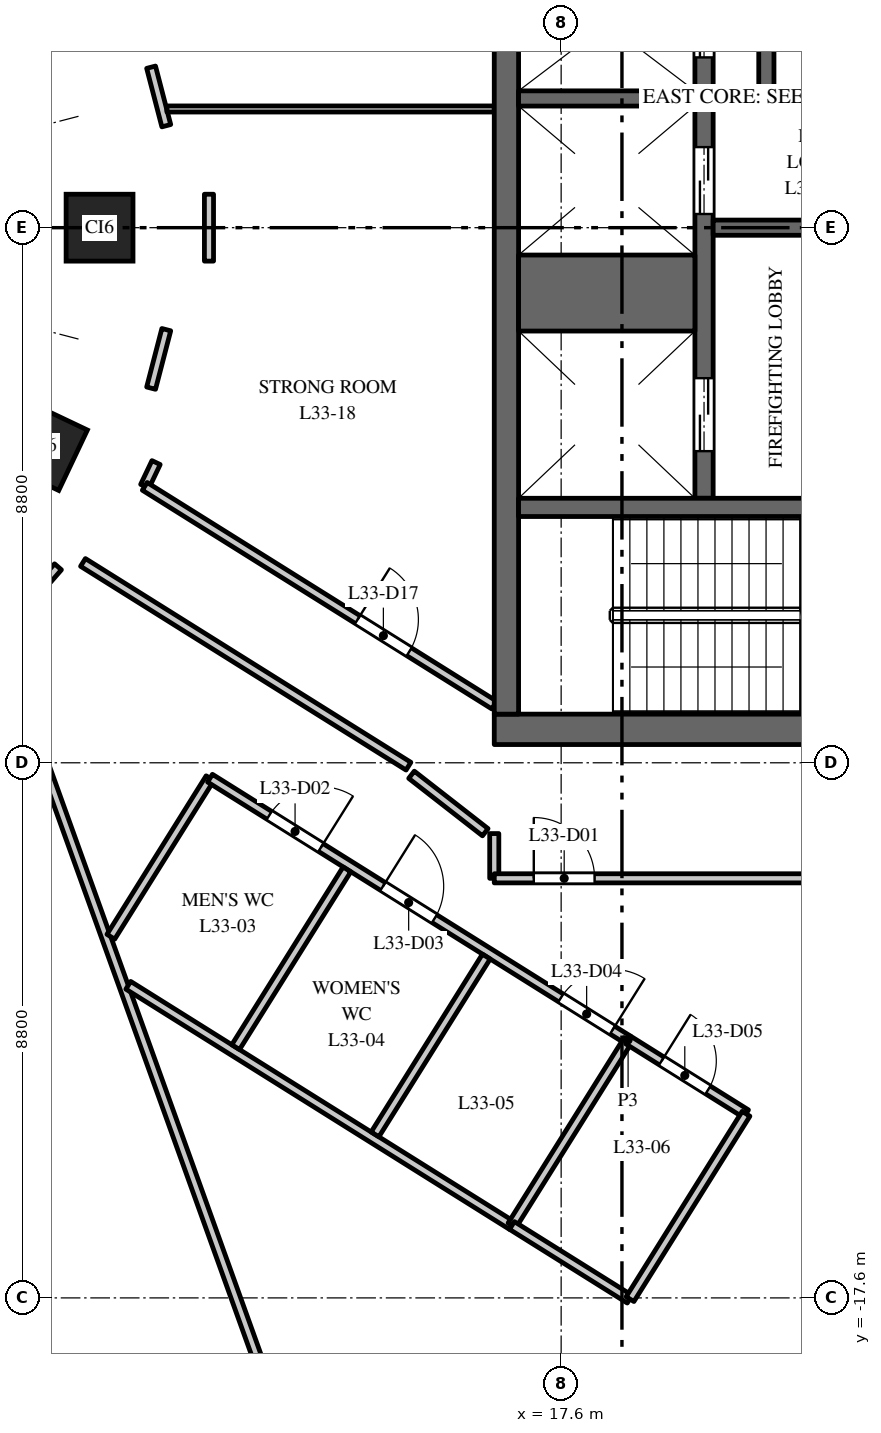
"""IFC4 building model, lengths in metres.
Left out: names, types, materials, properties, quantities, classifications, styles, units other than length and angle.
Written with IfcOpenShell. Run it as: python <this file> out.ifc"""

import sys

from ifc_helpers import new_model, si_unit, direction, frame, frame_2d, origin, origin_2d, place, context, subcontext, project, spatial, rectangle, extrude, element, fill, save


model = new_model("IFC4")
c1 = context("Model", 3, precision=1e-05, world=origin(), true_north=direction((0.0, 1.0)))
c2 = subcontext(c1, "Body", "Model", "MODEL_VIEW")
j1 = project(units=[si_unit("LENGTHUNIT", "METRE"), si_unit("PLANEANGLEUNIT", "RADIAN")], contexts=[c1])
p1 = place(None, origin())
s1 = spatial("IfcSite", under=j1, at=p1, CompositionType="ELEMENT")
p2 = place(p1, origin())
s2 = spatial("IfcBuilding", under=s1, at=p2, CompositionType="ELEMENT")
p3 = place(p2, frame((0.0, 0.0, 146.0)))
s3 = spatial("IfcBuildingStorey", under=s2, at=p3, CompositionType="ELEMENT", Elevation=146.0)
for number, where, z_axis, x_axis in (
    (1, (10.008, 0.0, 0.0), (0.0, 0.0, 1.0), (0.0, 1.0, 0.0)),
    (2, (9.076, 3.588, 0.0), (0.0, 0.0, 1.0), (-0.429, 0.903, 0.0)),
    (3, (9.076, -3.588, 0.0), (0.0, 0.0, 1.0), (0.429, 0.903, 0.0)),
):
    element("IfcColumn", number, at=place(p3, frame(where, z_axis=z_axis, x_axis=x_axis)), inside=s3, PredefinedType="COLUMN", context=c2, shape_type="SweptSolid", body=[
        extrude(rectangle(XDim=1.1, YDim=1.1, at=origin_2d()), origin(), (0.0, 0.0, 1.0), 4.0),
    ])
p4 = place(p3, frame((16.5, -8.25, 0.0), z_axis=(0.0, 0.0, 1.0), x_axis=(1.0, 0.0, 0.0)))
e4 = element("IfcWall", 4, at=p4, inside=s3, PredefinedType="SHEAR", context=c2, shape_type="SweptSolid", body=[
    extrude(rectangle(XDim=15.0, YDim=0.5, at=frame_2d((7.5, 0.0))), origin(), (0.0, 0.0, 1.0), 3.7),
])
p5 = place(p4, frame((6.9, 0.0, 0.0)))
e5 = element("IfcOpeningElement", 5, at=p5, cuts=e4, PredefinedType="OPENING", context=c2, shape_type="SweptSolid", body=[
    extrude(rectangle(XDim=1.2, YDim=2.1, at=frame_2d((0.6, 1.05))), frame((0.0, 0.26, 0.0), z_axis=(0.0, -1.0, 0.0), x_axis=(1.0, 0.0, 0.0)), (0.0, 0.0, 1.0), 0.52),
])
p6 = place(p4, frame((12.425, 0.0, 0.0)))
e6 = element("IfcOpeningElement", 6, at=p6, cuts=e4, PredefinedType="OPENING", context=c2, shape_type="SweptSolid", body=[
    extrude(rectangle(XDim=0.9, YDim=2.1, at=frame_2d((0.45, 1.05))), frame((0.0, 0.26, 0.0), z_axis=(0.0, -1.0, 0.0), x_axis=(1.0, 0.0, 0.0)), (0.0, 0.0, 1.0), 0.52),
])
p7 = place(p3, frame((19.95, -4.45, 0.0), z_axis=(0.0, 0.0, 1.0), x_axis=(0.0, 1.0, 0.0)))
e7 = element("IfcWall", 7, at=p7, inside=s3, PredefinedType="SHEAR", context=c2, shape_type="SweptSolid", body=[
    extrude(rectangle(XDim=8.9, YDim=0.3, at=frame_2d((4.45, 0.0))), origin(), (0.0, 0.0, 1.0), 3.7),
])
p8 = place(p7, frame((0.775, 0.0, 0.0)))
e8 = element("IfcOpeningElement", 8, at=p8, cuts=e7, PredefinedType="OPENING", context=c2, shape_type="SweptSolid", body=[
    extrude(rectangle(XDim=1.2, YDim=2.1, at=frame_2d((0.6, 1.05))), frame((0.0, 0.16, 0.0), z_axis=(0.0, -1.0, 0.0), x_axis=(1.0, 0.0, 0.0)), (0.0, 0.0, 1.0), 0.32),
])
p9 = place(p7, frame((4.675, 0.0, 0.0)))
e9 = element("IfcOpeningElement", 9, at=p9, cuts=e7, PredefinedType="OPENING", context=c2, shape_type="SweptSolid", body=[
    extrude(rectangle(XDim=1.1, YDim=2.1, at=frame_2d((0.55, 1.05))), frame((0.0, 0.16, 0.0), z_axis=(0.0, -1.0, 0.0), x_axis=(1.0, 0.0, 0.0)), (0.0, 0.0, 1.0), 0.32),
])
p10 = place(p7, frame((7.25, 0.0, 0.0)))
e10 = element("IfcOpeningElement", 10, at=p10, cuts=e7, PredefinedType="OPENING", context=c2, shape_type="SweptSolid", body=[
    extrude(rectangle(XDim=1.1, YDim=2.1, at=frame_2d((0.55, 1.05))), frame((0.0, 0.16, 0.0), z_axis=(0.0, -1.0, 0.0), x_axis=(1.0, 0.0, 0.0)), (0.0, 0.0, 1.0), 0.32),
])
p11 = place(p3, frame((20.1, 0.0, 0.0), z_axis=(0.0, 0.0, 1.0), x_axis=(1.0, 0.0, 0.0)))
e11 = element("IfcWall", 11, at=p11, inside=s3, PredefinedType="SHEAR", context=c2, shape_type="SweptSolid", body=[
    extrude(rectangle(XDim=3.28, YDim=0.25, at=frame_2d((1.64, 0.0))), origin(), (0.0, 0.0, 1.0), 3.7),
])
p12 = place(p3, frame((16.7, -8.0, 0.0), z_axis=(0.0, 0.0, 1.0), x_axis=(0.0, 1.0, 0.0)))
e12 = element("IfcWall", 12, at=p12, inside=s3, PredefinedType="SHEAR", context=c2, shape_type="SweptSolid", body=[
    extrude(rectangle(XDim=16.0, YDim=0.4, at=frame_2d((8.0, 0.0))), origin(), (0.0, 0.0, 1.0), 3.7),
])
p13 = place(p3, frame((16.9, -1.075, 0.0), z_axis=(0.0, 0.0, 1.0), x_axis=(1.0, 0.0, 0.0)))
e13 = element("IfcWall", 13, at=p13, inside=s3, PredefinedType="SHEAR", context=c2, shape_type="SweptSolid", body=[
    extrude(rectangle(XDim=2.9, YDim=1.25, at=frame_2d((1.45, 0.0))), origin(), (0.0, 0.0, 1.0), 3.7),
])
p14 = place(p3, frame((16.9, 2.125, 0.0), z_axis=(0.0, 0.0, 1.0), x_axis=(1.0, 0.0, 0.0)))
e14 = element("IfcWall", 14, at=p14, inside=s3, PredefinedType="SHEAR", context=c2, shape_type="SweptSolid", body=[
    extrude(rectangle(XDim=2.9, YDim=0.25, at=frame_2d((1.45, 0.0))), origin(), (0.0, 0.0, 1.0), 3.7),
])
p15 = place(p3, frame((16.9, -4.6, 0.0), z_axis=(0.0, 0.0, 1.0), x_axis=(1.0, 0.0, 0.0)))
e15 = element("IfcWall", 15, at=p15, inside=s3, PredefinedType="SHEAR", context=c2, shape_type="SweptSolid", body=[
    extrude(rectangle(XDim=6.18, YDim=0.3, at=frame_2d((3.09, 0.0))), origin(), (0.0, 0.0, 1.0), 3.7),
])
p16 = place(p15, frame((4.9, 0.0, 0.0)))
e16 = element("IfcOpeningElement", 16, at=p16, cuts=e15, PredefinedType="OPENING", context=c2, shape_type="SweptSolid", body=[
    extrude(rectangle(XDim=1.1, YDim=2.1, at=frame_2d((0.55, 1.05))), frame((0.0, 0.16, 0.0), z_axis=(0.0, -1.0, 0.0), x_axis=(1.0, 0.0, 0.0)), (0.0, 0.0, 1.0), 0.32),
])
p17 = place(p3, frame((20.85, 2.125, 0.0), z_axis=(0.0, 0.0, 1.0), x_axis=(1.0, 0.0, 0.0)))
e17 = element("IfcWall", 17, at=p17, inside=s3, PredefinedType="SHEAR", context=c2, shape_type="SweptSolid", body=[
    extrude(rectangle(XDim=2.53, YDim=0.25, at=frame_2d((1.265, 0.0))), origin(), (0.0, 0.0, 1.0), 3.7),
])
p18 = place(p3, frame((20.975, 2.25, 0.0), z_axis=(0.0, 0.0, 1.0), x_axis=(0.0, 1.0, 0.0)))
e18 = element("IfcWall", 18, at=p18, inside=s3, PredefinedType="SHEAR", context=c2, shape_type="SweptSolid", body=[
    extrude(rectangle(XDim=2.2, YDim=0.25, at=frame_2d((1.1, 0.0))), origin(), (0.0, 0.0, 1.0), 3.7),
])
p19 = place(p3, frame((8.478, -7.111, 0.0), z_axis=(0.0, 0.0, 1.0), x_axis=(0.338361922043, -0.941016051782, 0.0)))
e19 = element("IfcWall", 19, at=p19, inside=s3, PredefinedType="PARTITIONING", context=c2, shape_type="SweptSolid", body=[
    extrude(rectangle(XDim=19.417, YDim=0.15, at=frame_2d((9.708, 0.0))), origin(), (0.0, 0.0, 1.0), 2.85),
])
p20 = place(p3, frame((8.709, -6.285, 0.0), z_axis=(0.0, 0.0, 1.0), x_axis=(0.656365478363, 0.754443078578, 0.0)))
e20 = element("IfcWall", 20, at=p20, inside=s3, PredefinedType="PARTITIONING", context=c2, shape_type="SweptSolid", body=[
    extrude(rectangle(XDim=0.938, YDim=0.15, at=frame_2d((0.469, 0.0))), origin(), (0.0, 0.0, 1.0), 3.7),
])
p21 = place(p3, frame((9.736, -5.505, 0.0), z_axis=(0.0, 0.0, 1.0), x_axis=(0.847611500167, -0.53061732424, 0.0)))
e21 = element("IfcWall", 21, at=p21, inside=s3, PredefinedType="PARTITIONING", context=c2, shape_type="SweptSolid", body=[
    extrude(rectangle(XDim=6.315, YDim=0.15, at=frame_2d((3.158, 0.0))), origin(), (0.0, 0.0, 1.0), 3.7),
])
p22 = place(p3, frame((10.194, -11.661, 0.0), z_axis=(0.0, 0.0, 1.0), x_axis=(0.530355722606, 0.847775210477, 0.0)))
e22 = element("IfcWall", 22, at=p22, inside=s3, PredefinedType="PARTITIONING", context=c2, shape_type="SweptSolid", body=[
    extrude(rectangle(XDim=3.075, YDim=0.15, at=frame_2d((1.538, 0.0))), origin(), (0.0, 0.0, 1.0), 3.7),
])
p23 = place(p3, frame((10.481, -12.459, 0.0), z_axis=(0.0, 0.0, 1.0), x_axis=(0.847566924978, -0.530688522283, 0.0)))
e23 = element("IfcWall", 23, at=p23, inside=s3, PredefinedType="PARTITIONING", context=c2, shape_type="SweptSolid", body=[
    extrude(rectangle(XDim=7.445, YDim=0.15, at=frame_2d((3.722, 0.0))), origin(), (0.0, 0.0, 1.0), 3.7),
])
p24 = place(p3, frame((10.752, -4.254, 0.0), z_axis=(0.0, 0.0, 1.0), x_axis=(0.429758433873, 0.90294390109, 0.0)))
e24 = element("IfcWall", 24, at=p24, inside=s3, PredefinedType="PARTITIONING", context=c2, shape_type="SweptSolid", body=[
    extrude(rectangle(XDim=0.433, YDim=0.15, at=frame_2d((0.216, 0.0))), origin(), (0.0, 0.0, 1.0), 3.7),
])
p25 = place(p3, frame((10.752, -4.254, 0.0), z_axis=(0.0, 0.0, 1.0), x_axis=(0.847690706888, -0.530490777917, 0.0)))
e25 = element("IfcWall", 25, at=p25, inside=s3, PredefinedType="PARTITIONING", context=c2, shape_type="SweptSolid", body=[
    extrude(rectangle(XDim=6.781, YDim=0.15, at=frame_2d((3.39, 0.0))), origin(), (0.0, 0.0, 1.0), 3.7),
])
p26 = place(p25, frame((4.129, 0.0, 0.0)))
e26 = element("IfcOpeningElement", 26, at=p26, cuts=e25, PredefinedType="OPENING", context=c2, shape_type="SweptSolid", body=[
    extrude(rectangle(XDim=1.0, YDim=2.1, at=frame_2d((0.5, 1.05))), frame((0.0, 0.085, 0.0), z_axis=(0.0, -1.0, 0.0), x_axis=(1.0, 0.0, 0.0)), (0.0, 0.0, 1.0), 0.17),
])
for number, where, z_axis, x_axis in (
    (27, (10.856, -2.639, 0.0), (0.0, 0.0, 1.0), (0.252, 0.968, 0.0)),
    (28, (10.856, 2.639, 0.0), (0.0, 0.0, 1.0), (0.252, -0.968, 0.0)),
):
    element("IfcWall", number, at=place(p3, frame(where, z_axis=z_axis, x_axis=x_axis)), inside=s3, PredefinedType="PARTITIONING", context=c2, shape_type="SweptSolid", body=[
        extrude(rectangle(XDim=0.994, YDim=0.15, at=frame_2d((0.497, 0.0))), origin(), (0.0, 0.0, 1.0), 3.7),
    ])
p27 = place(p3, frame((11.116, 1.952, 0.0), z_axis=(0.0, 0.0, 1.0), x_axis=(1.0, 0.0, 0.0)))
e29 = element("IfcWall", 29, at=p27, inside=s3, PredefinedType="PARTITIONING", context=c2, shape_type="SweptSolid", body=[
    extrude(rectangle(XDim=5.384, YDim=0.1, at=frame_2d((2.692, 0.0))), origin(), (0.0, 0.0, 1.0), 3.7),
])
p28 = place(p3, frame((11.808, -0.55, 0.0), z_axis=(0.0, 0.0, 1.0), x_axis=(0.0, 1.0, 0.0)))
e30 = element("IfcWall", 30, at=p28, inside=s3, PredefinedType="PARTITIONING", context=c2, shape_type="SweptSolid", body=[
    extrude(rectangle(XDim=1.1, YDim=0.15, at=frame_2d((0.55, 0.0))), origin(), (0.0, 0.0, 1.0), 3.7),
])
p29 = place(p3, frame((11.825, -9.053, 0.0), z_axis=(0.0, 0.0, 1.0), x_axis=(0.847585513821, -0.530658832737, 0.0)))
e31 = element("IfcWall", 31, at=p29, inside=s3, PredefinedType="PARTITIONING", context=c2, shape_type="SweptSolid", body=[
    extrude(rectangle(XDim=8.113, YDim=0.15, at=frame_2d((4.056, 0.0))), origin(), (0.0, 0.0, 1.0), 3.7),
])
p30 = place(p29, frame((1.15, 0.0, 0.0)))
e32 = element("IfcOpeningElement", 32, at=p30, cuts=e31, PredefinedType="OPENING", context=c2, shape_type="SweptSolid", body=[
    extrude(rectangle(XDim=1.0, YDim=2.1, at=frame_2d((0.5, 1.05))), frame((0.0, 0.085, 0.0), z_axis=(0.0, -1.0, 0.0), x_axis=(1.0, 0.0, 0.0)), (0.0, 0.0, 1.0), 0.17),
])
p31 = place(p29, frame((3.355, 0.0, 0.0)))
e33 = element("IfcOpeningElement", 33, at=p31, cuts=e31, PredefinedType="OPENING", context=c2, shape_type="SweptSolid", body=[
    extrude(rectangle(XDim=1.0, YDim=2.1, at=frame_2d((0.5, 1.05))), frame((0.0, 0.085, 0.0), z_axis=(0.0, -1.0, 0.0), x_axis=(1.0, 0.0, 0.0)), (0.0, 0.0, 1.0), 0.17),
])
p32 = place(p29, frame((6.808, 0.0, 0.0)))
e34 = element("IfcOpeningElement", 34, at=p32, cuts=e31, PredefinedType="OPENING", context=c2, shape_type="SweptSolid", body=[
    extrude(rectangle(XDim=1.0, YDim=2.1, at=frame_2d((0.5, 1.05))), frame((0.0, 0.085, 0.0), z_axis=(0.0, -1.0, 0.0), x_axis=(1.0, 0.0, 0.0)), (0.0, 0.0, 1.0), 0.17),
])
p33 = place(p3, frame((12.247, -13.476, 0.0), z_axis=(0.0, 0.0, 1.0), x_axis=(0.530603340991, 0.847620253727, 0.0)))
e35 = element("IfcWall", 35, at=p33, inside=s3, PredefinedType="PARTITIONING", context=c2, shape_type="SweptSolid", body=[
    extrude(rectangle(XDim=3.448, YDim=0.15, at=frame_2d((1.724, 0.0))), origin(), (0.0, 0.0, 1.0), 3.7),
])
p34 = place(p3, frame((14.539, -14.911, 0.0), z_axis=(0.0, 0.0, 1.0), x_axis=(0.530507835566, 0.847680031853, 0.0)))
e36 = element("IfcWall", 36, at=p34, inside=s3, PredefinedType="PARTITIONING", context=c2, shape_type="SweptSolid", body=[
    extrude(rectangle(XDim=3.449, YDim=0.15, at=frame_2d((1.725, 0.0))), origin(), (0.0, 0.0, 1.0), 3.7),
])
p35 = place(p3, frame((16.5, -10.7, 0.0), z_axis=(0.0, 0.0, 1.0), x_axis=(0.0, 1.0, 0.0)))
e37 = element("IfcWall", 37, at=p35, inside=s3, PredefinedType="PARTITIONING", context=c2, shape_type="SweptSolid", body=[
    extrude(rectangle(XDim=0.736, YDim=0.15, at=frame_2d((0.368, 0.0))), origin(), (0.0, 0.0, 1.0), 3.7),
])
p36 = place(p3, frame((16.5, -10.7, 0.0), z_axis=(0.0, 0.0, 1.0), x_axis=(1.0, 0.0, 0.0)))
e38 = element("IfcWall", 38, at=p36, inside=s3, PredefinedType="PARTITIONING", context=c2, shape_type="SweptSolid", body=[
    extrude(rectangle(XDim=15.0, YDim=0.15, at=frame_2d((7.5, 0.0))), origin(), (0.0, 0.0, 1.0), 2.75),
])
p37 = place(p36, frame((0.65, 0.0, 0.0)))
e39 = element("IfcOpeningElement", 39, at=p37, cuts=e38, PredefinedType="OPENING", context=c2, shape_type="SweptSolid", body=[
    extrude(rectangle(XDim=1.0, YDim=2.1, at=frame_2d((0.5, 1.05))), frame((0.0, 0.085, 0.0), z_axis=(0.0, -1.0, 0.0), x_axis=(1.0, 0.0, 0.0)), (0.0, 0.0, 1.0), 0.17),
])
p38 = place(p36, frame((8.847, 0.0, 0.0)))
e40 = element("IfcOpeningElement", 40, at=p38, cuts=e38, PredefinedType="OPENING", context=c2, shape_type="SweptSolid", body=[
    extrude(rectangle(XDim=1.0, YDim=2.1, at=frame_2d((0.5, 1.05))), frame((0.0, 0.085, 0.0), z_axis=(0.0, -1.0, 0.0), x_axis=(1.0, 0.0, 0.0)), (0.0, 0.0, 1.0), 0.17),
])
p39 = place(p3, frame((16.791, -16.409, 0.0), z_axis=(0.0, 0.0, 1.0), x_axis=(0.530602380468, 0.847620855006, 0.0)))
e41 = element("IfcWall", 41, at=p39, inside=s3, PredefinedType="PARTITIONING", context=c2, shape_type="SweptSolid", body=[
    extrude(rectangle(XDim=3.6, YDim=0.15, at=frame_2d((1.8, 0.0))), origin(), (0.0, 0.0, 1.0), 3.7),
])
p40 = place(p3, frame((16.791, -16.409, 0.0), z_axis=(0.0, 0.0, 1.0), x_axis=(0.847577713145, -0.530671292026, 0.0)))
e42 = element("IfcWall", 42, at=p40, inside=s3, PredefinedType="PARTITIONING", context=c2, shape_type="SweptSolid", body=[
    extrude(rectangle(XDim=2.284, YDim=0.15, at=frame_2d((1.142, 0.0))), origin(), (0.0, 0.0, 1.0), 3.7),
])
p41 = place(p3, frame((18.701, -13.358, 0.0), z_axis=(0.0, 0.0, 1.0), x_axis=(0.847704532397, -0.530468684989, 0.0)))
e43 = element("IfcWall", 43, at=p41, inside=s3, PredefinedType="PARTITIONING", context=c2, shape_type="SweptSolid", body=[
    extrude(rectangle(XDim=2.289, YDim=0.15, at=frame_2d((1.145, 0.0))), origin(), (0.0, 0.0, 1.0), 3.7),
])
p42 = place(p41, frame((0.65, 0.0, 0.0)))
e44 = element("IfcOpeningElement", 44, at=p42, cuts=e43, PredefinedType="OPENING", context=c2, shape_type="SweptSolid", body=[
    extrude(rectangle(XDim=0.9, YDim=2.1, at=frame_2d((0.45, 1.05))), frame((0.0, 0.085, 0.0), z_axis=(0.0, -1.0, 0.0), x_axis=(1.0, 0.0, 0.0)), (0.0, 0.0, 1.0), 0.17),
])
p43 = place(p3, frame((18.733, -17.62, 0.0), z_axis=(0.0, 0.0, 1.0), x_axis=(0.530627347961, 0.847605225088, 0.0)))
e45 = element("IfcWall", 45, at=p43, inside=s3, PredefinedType="PARTITIONING", context=c2, shape_type="SweptSolid", body=[
    extrude(rectangle(XDim=3.596, YDim=0.15, at=frame_2d((1.798, 0.0))), origin(), (0.0, 0.0, 1.0), 3.7),
])
p44 = place(p3, frame((16.352, -9.942, 0.0), z_axis=(0.0, 0.0, 1.0), x_axis=(-0.788950226826, 0.614457109643, 0.0)))
e46 = element("IfcWall", 46, at=p44, inside=s3, PredefinedType="PARTITIONING", context=c2, shape_type="SweptSolid", body=[
    extrude(rectangle(XDim=1.538, YDim=0.15, at=frame_2d((0.769, 0.0))), origin(), (0.0, 0.0, 1.0), 3.7),
])
p45 = place(p8, origin())
e47 = element("IfcDoor", 47, at=p45, inside=s3, OperationType="DOUBLE_DOOR_SLIDING", PredefinedType="DOOR", context=c2, shape_type="SweptSolid", body=[
    extrude(rectangle(XDim=1.2, YDim=2.1, at=frame_2d((0.6, 1.05))), frame((0.0, 0.025, 0.0), z_axis=(0.0, -1.0, 0.0), x_axis=(1.0, 0.0, 0.0)), (0.0, 0.0, 1.0), 0.05),
])
fill(e8, e47)
p46 = place(p9, origin())
e48 = element("IfcDoor", 48, at=p46, inside=s3, OperationType="DOUBLE_DOOR_SLIDING", PredefinedType="DOOR", context=c2, shape_type="SweptSolid", body=[
    extrude(rectangle(XDim=1.1, YDim=2.1, at=frame_2d((0.55, 1.05))), frame((0.0, 0.025, 0.0), z_axis=(0.0, -1.0, 0.0), x_axis=(1.0, 0.0, 0.0)), (0.0, 0.0, 1.0), 0.05),
])
fill(e9, e48)
p47 = place(p10, origin())
e49 = element("IfcDoor", 49, at=p47, inside=s3, OperationType="DOUBLE_DOOR_SLIDING", PredefinedType="DOOR", context=c2, shape_type="SweptSolid", body=[
    extrude(rectangle(XDim=1.1, YDim=2.1, at=frame_2d((0.55, 1.05))), frame((0.0, 0.025, 0.0), z_axis=(0.0, -1.0, 0.0), x_axis=(1.0, 0.0, 0.0)), (0.0, 0.0, 1.0), 0.05),
])
fill(e10, e49)
p48 = place(p37, origin())
e50 = element("IfcDoor", 50, at=p48, inside=s3, OperationType="SINGLE_SWING_LEFT", PredefinedType="DOOR", context=c2, shape_type="SweptSolid", body=[
    extrude(rectangle(XDim=1.0, YDim=2.1, at=frame_2d((0.5, 1.05))), frame((0.0, 0.025, 0.0), z_axis=(0.0, -1.0, 0.0), x_axis=(1.0, 0.0, 0.0)), (0.0, 0.0, 1.0), 0.05),
])
fill(e39, e50)
p49 = place(p30, origin())
e51 = element("IfcDoor", 51, at=p49, inside=s3, OperationType="SINGLE_SWING_RIGHT", PredefinedType="DOOR", context=c2, shape_type="SweptSolid", body=[
    extrude(rectangle(XDim=1.0, YDim=2.1, at=frame_2d((0.5, 1.05))), frame((0.0, 0.025, 0.0), z_axis=(0.0, -1.0, 0.0), x_axis=(1.0, 0.0, 0.0)), (0.0, 0.0, 1.0), 0.05),
])
fill(e32, e51)
p50 = place(p31, origin())
e52 = element("IfcDoor", 52, at=p50, inside=s3, OperationType="SINGLE_SWING_LEFT", PredefinedType="DOOR", context=c2, shape_type="SweptSolid", body=[
    extrude(rectangle(XDim=1.0, YDim=2.1, at=frame_2d((0.5, 1.05))), frame((0.0, 0.025, 0.0), z_axis=(0.0, -1.0, 0.0), x_axis=(1.0, 0.0, 0.0)), (0.0, 0.0, 1.0), 0.05),
])
fill(e33, e52)
p51 = place(p32, origin())
e53 = element("IfcDoor", 53, at=p51, inside=s3, OperationType="SINGLE_SWING_RIGHT", PredefinedType="DOOR", context=c2, shape_type="SweptSolid", body=[
    extrude(rectangle(XDim=1.0, YDim=2.1, at=frame_2d((0.5, 1.05))), frame((0.0, 0.025, 0.0), z_axis=(0.0, -1.0, 0.0), x_axis=(1.0, 0.0, 0.0)), (0.0, 0.0, 1.0), 0.05),
])
fill(e34, e53)
p52 = place(p42, origin())
e54 = element("IfcDoor", 54, at=p52, inside=s3, OperationType="SINGLE_SWING_LEFT", PredefinedType="DOOR", context=c2, shape_type="SweptSolid", body=[
    extrude(rectangle(XDim=0.9, YDim=2.1, at=frame_2d((0.45, 1.05))), frame((0.0, 0.025, 0.0), z_axis=(0.0, -1.0, 0.0), x_axis=(1.0, 0.0, 0.0)), (0.0, 0.0, 1.0), 0.05),
])
fill(e44, e54)
p53 = place(p26, origin())
e55 = element("IfcDoor", 55, at=p53, inside=s3, OperationType="SINGLE_SWING_LEFT", PredefinedType="DOOR", context=c2, shape_type="SweptSolid", body=[
    extrude(rectangle(XDim=1.0, YDim=2.1, at=frame_2d((0.5, 1.05))), frame((0.0, 0.025, 0.0), z_axis=(0.0, -1.0, 0.0), x_axis=(1.0, 0.0, 0.0)), (0.0, 0.0, 1.0), 0.05),
])
fill(e26, e55)
save(model, sys.argv[1])
